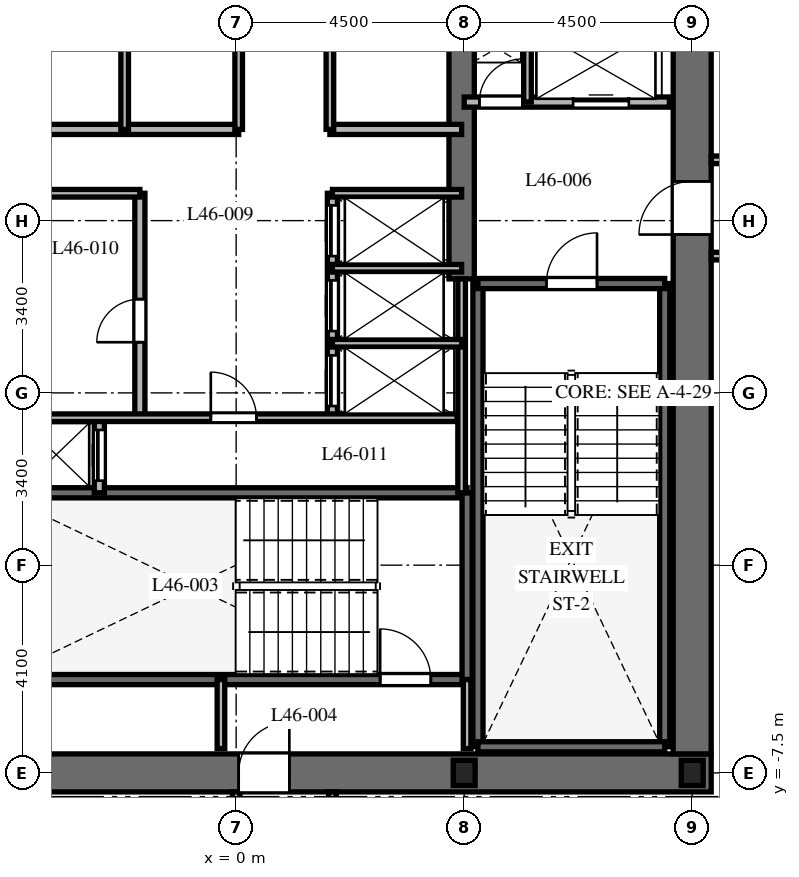
"""IFC4 building model, lengths in metres.
Left out: names, types, materials, properties, quantities, classifications, styles, units other than length and angle.
Written with IfcOpenShell. Run it as: python <this file> out.ifc"""

import sys

from ifc_helpers import new_model, si_unit, direction, frame, frame_2d, origin, origin_2d, place, context, subcontext, project, spatial, rectangle, i_section, extrude, element, fill, save


model = new_model("IFC4")
c1 = context("Model", 3, precision=1e-05, world=origin(), true_north=direction((0.0, 1.0)))
c2 = subcontext(c1, "Body", "Model", "MODEL_VIEW")
j1 = project(units=[si_unit("LENGTHUNIT", "METRE"), si_unit("PLANEANGLEUNIT", "RADIAN")], contexts=[c1])
p1 = place(None, origin())
s1 = spatial("IfcSite", under=j1, at=p1, CompositionType="ELEMENT")
p2 = place(p1, origin())
s2 = spatial("IfcBuilding", under=s1, at=p2, CompositionType="ELEMENT")
p3 = place(p2, frame((0.0, 0.0, 186.7)))
s3 = spatial("IfcBuildingStorey", under=s2, at=p3, CompositionType="ELEMENT", Elevation=186.7)
p4 = place(p3, frame((-9.375, -7.5, 0.0), z_axis=(0.0, 0.0, 1.0), x_axis=(1.0, 0.0, 0.0)))
e1 = element("IfcWall", 1, at=p4, inside=s3, PredefinedType="SHEAR", context=c2, shape_type="SweptSolid", body=[
    extrude(rectangle(XDim=18.75, YDim=0.75, at=frame_2d((9.375, 0.0))), origin(), (0.0, 0.0, 1.0), 3.7),
])
p5 = place(p4, frame((9.425, 0.0, 0.0)))
e2 = element("IfcOpeningElement", 2, at=p5, cuts=e1, PredefinedType="OPENING", context=c2, shape_type="SweptSolid", body=[
    extrude(rectangle(XDim=1.0, YDim=2.15, at=frame_2d((0.5, 1.075))), frame((0.0, 0.385, 0.0), z_axis=(0.0, -1.0, 0.0), x_axis=(1.0, 0.0, 0.0)), (0.0, 0.0, 1.0), 0.77),
])
p6 = place(p3, frame((9.0, -7.125, 0.0), z_axis=(0.0, 0.0, 1.0), x_axis=(0.0, 1.0, 0.0)))
e3 = element("IfcWall", 3, at=p6, inside=s3, PredefinedType="SHEAR", context=c2, shape_type="SweptSolid", body=[
    extrude(rectangle(XDim=14.25, YDim=0.75, at=frame_2d((7.125, 0.0))), origin(), (0.0, 0.0, 1.0), 3.7),
])
p7 = place(p6, frame((10.25, 0.0, 0.0)))
e4 = element("IfcOpeningElement", 4, at=p7, cuts=e3, PredefinedType="OPENING", context=c2, shape_type="SweptSolid", body=[
    extrude(rectangle(XDim=1.05, YDim=2.15, at=frame_2d((0.525, 1.075))), frame((0.0, 0.385, 0.0), z_axis=(0.0, -1.0, 0.0), x_axis=(1.0, 0.0, 0.0)), (0.0, 0.0, 1.0), 0.77),
])
p8 = place(p3, frame((4.45, 2.25, 0.0), z_axis=(0.0, 0.0, 1.0), x_axis=(0.0, 1.0, 0.0)))
e5 = element("IfcWall", 5, at=p8, inside=s3, PredefinedType="SHEAR", context=c2, shape_type="SweptSolid", body=[
    extrude(rectangle(XDim=4.875, YDim=0.5, at=frame_2d((2.438, 0.0))), origin(), (0.0, 0.0, 1.0), 3.7),
])
for number, where, z_axis, x_axis in (
    (6, (4.772, -6.985, 0.0), (0.0, 0.0, 1.0), (0.0, 1.0, 0.0)),
    (7, (8.458, -6.985, 0.0), (0.0, 0.0, 1.0), (0.0, 1.0, 0.0)),
):
    element("IfcWall", number, at=place(p3, frame(where, z_axis=z_axis, x_axis=x_axis)), inside=s3, PredefinedType="SHEAR", context=c2, shape_type="SweptSolid", body=[
        extrude(rectangle(XDim=9.143, YDim=0.2, at=frame_2d((4.572, 0.0))), origin(), (0.0, 0.0, 1.0), 3.7),
    ])
p9 = place(p3, frame((4.772, -6.985, 0.0), z_axis=(0.0, 0.0, 1.0), x_axis=(1.0, 0.0, 0.0)))
e8 = element("IfcWall", 8, at=p9, inside=s3, PredefinedType="SHEAR", context=c2, shape_type="SweptSolid", body=[
    extrude(rectangle(XDim=3.686, YDim=0.2, at=frame_2d((1.843, 0.0))), origin(), (0.0, 0.0, 1.0), 3.7),
])
p10 = place(p3, frame((4.772, 2.158, 0.0), z_axis=(0.0, 0.0, 1.0), x_axis=(1.0, 0.0, 0.0)))
e9 = element("IfcWall", 9, at=p10, inside=s3, PredefinedType="SHEAR", context=c2, shape_type="SweptSolid", body=[
    extrude(rectangle(XDim=3.686, YDim=0.2, at=frame_2d((1.843, 0.0))), origin(), (0.0, 0.0, 1.0), 3.7),
])
p11 = place(p10, frame((1.35, 0.0, 0.0)))
e10 = element("IfcOpeningElement", 10, at=p11, cuts=e9, PredefinedType="OPENING", context=c2, shape_type="SweptSolid", body=[
    extrude(rectangle(XDim=1.0, YDim=2.15, at=frame_2d((0.5, 1.075))), frame((0.0, 0.11, 0.0), z_axis=(0.0, -1.0, 0.0), x_axis=(1.0, 0.0, 0.0)), (0.0, 0.0, 1.0), 0.22),
])
p12 = place(p3, frame((-4.608, -5.658, 0.0), z_axis=(0.0, 0.0, 1.0), x_axis=(1.0, 0.0, 0.0)))
e11 = element("IfcWall", 11, at=p12, inside=s3, PredefinedType="SHEAR", context=c2, shape_type="SweptSolid", body=[
    extrude(rectangle(XDim=9.166, YDim=0.2, at=frame_2d((4.583, 0.0))), origin(), (0.0, 0.0, 1.0), 3.7),
])
p13 = place(p12, frame((7.45, 0.0, 0.0)))
e12 = element("IfcOpeningElement", 12, at=p13, cuts=e11, PredefinedType="OPENING", context=c2, shape_type="SweptSolid", body=[
    extrude(rectangle(XDim=1.0, YDim=2.15, at=frame_2d((0.5, 1.075))), frame((0.0, 0.11, 0.0), z_axis=(0.0, -1.0, 0.0), x_axis=(1.0, 0.0, 0.0)), (0.0, 0.0, 1.0), 0.22),
])
p14 = place(p3, frame((-4.608, -1.972, 0.0), z_axis=(0.0, 0.0, 1.0), x_axis=(1.0, 0.0, 0.0)))
e13 = element("IfcWall", 13, at=p14, inside=s3, PredefinedType="SHEAR", context=c2, shape_type="SweptSolid", body=[
    extrude(rectangle(XDim=9.166, YDim=0.2, at=frame_2d((4.583, 0.0))), origin(), (0.0, 0.0, 1.0), 3.7),
])
p15 = place(p3, frame((4.558, -5.658, 0.0), z_axis=(0.0, 0.0, 1.0), x_axis=(0.0, 1.0, 0.0)))
e14 = element("IfcWall", 14, at=p15, inside=s3, PredefinedType="SHEAR", context=c2, shape_type="SweptSolid", body=[
    extrude(rectangle(XDim=3.686, YDim=0.2, at=frame_2d((1.843, 0.0))), origin(), (0.0, 0.0, 1.0), 3.7),
])
for number, where, z_axis, x_axis in (
    (15, (4.5, -7.5, 0.0), (0.0, 0.0, 1.0), (1.0, 0.0, 0.0)),
    (16, (9.0, -7.5, 0.0), (0.0, 0.0, 1.0), (1.0, 0.0, 0.0)),
):
    element("IfcColumn", number, at=place(p3, frame(where, z_axis=z_axis, x_axis=x_axis)), inside=s3, PredefinedType="COLUMN", context=c2, shape_type="SweptSolid", body=[
        extrude(i_section(OverallWidth=0.432, OverallDepth=0.498, WebThickness=0.056, FlangeThickness=0.089, at=origin_2d()), origin(), (0.0, 0.0, 1.0), 3.7),
    ])
for number, where, z_axis, x_axis in (
    (17, (-0.3, -7.02, 0.0), (0.0, 0.0, 1.0), (0.0, 1.0, 0.0)),
    (18, (4.558, -7.02, 0.0), (0.0, 0.0, 1.0), (0.0, 1.0, 0.0)),
):
    element("IfcWall", number, at=place(p3, frame(where, z_axis=z_axis, x_axis=x_axis)), inside=s3, PredefinedType="PARTITIONING", context=c2, shape_type="SweptSolid", body=[
        extrude(rectangle(XDim=1.362, YDim=0.15, at=frame_2d((0.681, 0.0))), origin(), (0.0, 0.0, 1.0), 3.4),
    ])
p16 = place(p3, frame((4.5, 5.74, 0.0), z_axis=(0.0, 0.0, 1.0), x_axis=(1.0, 0.0, 0.0)))
e19 = element("IfcWall", 19, at=p16, inside=s3, PredefinedType="PARTITIONING", context=c2, shape_type="SweptSolid", body=[
    extrude(rectangle(XDim=4.05, YDim=0.2, at=frame_2d((2.025, 0.0))), origin(), (0.0, 0.0, 1.0), 3.4),
])
p17 = place(p16, frame((0.3, 0.0, 0.0)))
e20 = element("IfcOpeningElement", 20, at=p17, cuts=e19, PredefinedType="OPENING", context=c2, shape_type="SweptSolid", body=[
    extrude(rectangle(XDim=0.85, YDim=2.03, at=frame_2d((0.425, 1.015))), frame((0.0, 0.11, 0.0), z_axis=(0.0, -1.0, 0.0), x_axis=(1.0, 0.0, 0.0)), (0.0, 0.0, 1.0), 0.22),
])
p18 = place(p16, frame((2.15, 0.0, 0.0)))
e21 = element("IfcOpeningElement", 21, at=p18, cuts=e19, PredefinedType="OPENING", context=c2, shape_type="SweptSolid", body=[
    extrude(rectangle(XDim=1.1, YDim=2.2, at=frame_2d((0.55, 1.1))), frame((0.0, 0.11, 0.0), z_axis=(0.0, -1.0, 0.0), x_axis=(1.0, 0.0, 0.0)), (0.0, 0.0, 1.0), 0.22),
])
p19 = place(p3, frame((5.75, 5.74, 0.0), z_axis=(0.0, 0.0, 1.0), x_axis=(0.0, 1.0, 0.0)))
e22 = element("IfcWall", 22, at=p19, inside=s3, PredefinedType="PARTITIONING", context=c2, shape_type="SweptSolid", body=[
    extrude(rectangle(XDim=1.41, YDim=0.15, at=frame_2d((0.705, 0.0))), origin(), (0.0, 0.0, 1.0), 3.4),
])
p20 = place(p3, frame((-2.7, -1.972, 0.0), z_axis=(0.0, 0.0, 1.0), x_axis=(0.0, 1.0, 0.0)))
e23 = element("IfcWall", 23, at=p20, inside=s3, PredefinedType="PARTITIONING", context=c2, shape_type="SweptSolid", body=[
    extrude(rectangle(XDim=1.472, YDim=0.2, at=frame_2d((0.736, 0.0))), origin(), (0.0, 0.0, 1.0), 3.4),
])
p21 = place(p20, frame((0.24, 0.0, 0.0)))
e24 = element("IfcOpeningElement", 24, at=p21, cuts=e23, PredefinedType="OPENING", context=c2, shape_type="SweptSolid", body=[
    extrude(rectangle(XDim=1.0, YDim=2.2, at=frame_2d((0.5, 1.1))), frame((0.0, 0.11, 0.0), z_axis=(0.0, -1.0, 0.0), x_axis=(1.0, 0.0, 0.0)), (0.0, 0.0, 1.0), 0.22),
])
p22 = place(p3, frame((-4.45, 5.2, 0.0), z_axis=(0.0, 0.0, 1.0), x_axis=(1.0, 0.0, 0.0)))
e25 = element("IfcWall", 25, at=p22, inside=s3, PredefinedType="PARTITIONING", context=c2, shape_type="SweptSolid", body=[
    extrude(rectangle(XDim=4.5, YDim=0.2, at=frame_2d((2.25, 0.0))), origin(), (0.0, 0.0, 1.0), 3.4),
])
p23 = place(p3, frame((1.85, 5.2, 0.0), z_axis=(0.0, 0.0, 1.0), x_axis=(1.0, 0.0, 0.0)))
e26 = element("IfcWall", 26, at=p23, inside=s3, PredefinedType="PARTITIONING", context=c2, shape_type="SweptSolid", body=[
    extrude(rectangle(XDim=2.6, YDim=0.2, at=frame_2d((1.3, 0.0))), origin(), (0.0, 0.0, 1.0), 3.4),
])
p24 = place(p3, frame((-2.2, 5.2, 0.0), z_axis=(0.0, 0.0, 1.0), x_axis=(0.0, 1.0, 0.0)))
e27 = element("IfcWall", 27, at=p24, inside=s3, PredefinedType="PARTITIONING", context=c2, shape_type="SweptSolid", body=[
    extrude(rectangle(XDim=1.85, YDim=0.15, at=frame_2d((0.925, 0.0))), origin(), (0.0, 0.0, 1.0), 3.4),
])
for number, where, z_axis, x_axis in (
    (28, (0.05, 5.2, 0.0), (0.0, 0.0, 1.0), (0.0, 1.0, 0.0)),
    (29, (1.85, 5.2, 0.0), (0.0, 0.0, 1.0), (0.0, 1.0, 0.0)),
):
    element("IfcWall", number, at=place(p3, frame(where, z_axis=z_axis, x_axis=x_axis)), inside=s3, PredefinedType="PARTITIONING", context=c2, shape_type="SweptSolid", body=[
        extrude(rectangle(XDim=1.95, YDim=0.15, at=frame_2d((0.975, 0.0))), origin(), (0.0, 0.0, 1.0), 3.4),
    ])
p25 = place(p3, frame((4.45, -1.972, 0.0), z_axis=(0.0, 0.0, 1.0), x_axis=(0.0, 1.0, 0.0)))
e30 = element("IfcWall", 30, at=p25, inside=s3, PredefinedType="PARTITIONING", context=c2, shape_type="SweptSolid", body=[
    extrude(rectangle(XDim=4.222, YDim=0.15, at=frame_2d((2.111, 0.0))), origin(), (0.0, 0.0, 1.0), 3.4),
])
p26 = place(p3, frame((-1.9, -0.5, 0.0), z_axis=(0.0, 0.0, 1.0), x_axis=(0.0, 1.0, 0.0)))
e31 = element("IfcWall", 31, at=p26, inside=s3, PredefinedType="PARTITIONING", context=c2, shape_type="SweptSolid", body=[
    extrude(rectangle(XDim=4.44, YDim=0.2, at=frame_2d((2.22, 0.0))), origin(), (0.0, 0.0, 1.0), 3.4),
])
p27 = place(p26, frame((1.5, 0.0, 0.0)))
e32 = element("IfcOpeningElement", 32, at=p27, cuts=e31, PredefinedType="OPENING", context=c2, shape_type="SweptSolid", body=[
    extrude(rectangle(XDim=0.85, YDim=2.03, at=frame_2d((0.425, 1.015))), frame((0.0, 0.11, 0.0), z_axis=(0.0, -1.0, 0.0), x_axis=(1.0, 0.0, 0.0)), (0.0, 0.0, 1.0), 0.22),
])
p28 = place(p3, frame((-4.45, 3.94, 0.0), z_axis=(0.0, 0.0, 1.0), x_axis=(1.0, 0.0, 0.0)))
e33 = element("IfcWall", 33, at=p28, inside=s3, PredefinedType="PARTITIONING", context=c2, shape_type="SweptSolid", body=[
    extrude(rectangle(XDim=2.55, YDim=0.15, at=frame_2d((1.275, 0.0))), origin(), (0.0, 0.0, 1.0), 3.4),
])
p29 = place(p3, frame((1.9, -0.5, 0.0), z_axis=(0.0, 0.0, 1.0), x_axis=(0.0, 1.0, 0.0)))
e34 = element("IfcWall", 34, at=p29, inside=s3, PredefinedType="PARTITIONING", context=c2, shape_type="SweptSolid", body=[
    extrude(rectangle(XDim=4.44, YDim=0.2, at=frame_2d((2.22, 0.0))), origin(), (0.0, 0.0, 1.0), 3.4),
])
p30 = place(p29, frame((0.24, 0.0, 0.0)))
e35 = element("IfcOpeningElement", 35, at=p30, cuts=e34, PredefinedType="OPENING", context=c2, shape_type="SweptSolid", body=[
    extrude(rectangle(XDim=1.0, YDim=2.2, at=frame_2d((0.5, 1.1))), frame((0.0, 0.11, 0.0), z_axis=(0.0, -1.0, 0.0), x_axis=(1.0, 0.0, 0.0)), (0.0, 0.0, 1.0), 0.22),
])
p31 = place(p29, frame((1.72, 0.0, 0.0)))
e36 = element("IfcOpeningElement", 36, at=p31, cuts=e34, PredefinedType="OPENING", context=c2, shape_type="SweptSolid", body=[
    extrude(rectangle(XDim=1.0, YDim=2.2, at=frame_2d((0.5, 1.1))), frame((0.0, 0.11, 0.0), z_axis=(0.0, -1.0, 0.0), x_axis=(1.0, 0.0, 0.0)), (0.0, 0.0, 1.0), 0.22),
])
p32 = place(p29, frame((3.2, 0.0, 0.0)))
e37 = element("IfcOpeningElement", 37, at=p32, cuts=e34, PredefinedType="OPENING", context=c2, shape_type="SweptSolid", body=[
    extrude(rectangle(XDim=1.0, YDim=2.2, at=frame_2d((0.5, 1.1))), frame((0.0, 0.11, 0.0), z_axis=(0.0, -1.0, 0.0), x_axis=(1.0, 0.0, 0.0)), (0.0, 0.0, 1.0), 0.22),
])
for number, where, z_axis, x_axis in (
    (38, (1.9, 3.94, 0.0), (0.0, 0.0, 1.0), (1.0, 0.0, 0.0)),
    (39, (1.9, 0.98, 0.0), (0.0, 0.0, 1.0), (1.0, 0.0, 0.0)),
    (40, (1.9, 2.46, 0.0), (0.0, 0.0, 1.0), (1.0, 0.0, 0.0)),
):
    element("IfcWall", number, at=place(p3, frame(where, z_axis=z_axis, x_axis=x_axis)), inside=s3, PredefinedType="PARTITIONING", context=c2, shape_type="SweptSolid", body=[
        extrude(rectangle(XDim=2.55, YDim=0.15, at=frame_2d((1.275, 0.0))), origin(), (0.0, 0.0, 1.0), 3.4),
    ])
p33 = place(p3, frame((-4.36, -0.49, 0.0), z_axis=(0.0, 0.0, 1.0), x_axis=(1.0, 0.0, 0.0)))
e41 = element("IfcWall", 41, at=p33, inside=s3, PredefinedType="PARTITIONING", context=c2, shape_type="SweptSolid", body=[
    extrude(rectangle(XDim=8.72, YDim=0.15, at=frame_2d((4.36, 0.0))), origin(), (0.0, 0.0, 1.0), 3.4),
])
p34 = place(p33, frame((3.86, 0.0, 0.0)))
e42 = element("IfcOpeningElement", 42, at=p34, cuts=e41, PredefinedType="OPENING", context=c2, shape_type="SweptSolid", body=[
    extrude(rectangle(XDim=0.9, YDim=2.03, at=frame_2d((0.45, 1.015))), frame((0.0, 0.085, 0.0), z_axis=(0.0, -1.0, 0.0), x_axis=(1.0, 0.0, 0.0)), (0.0, 0.0, 1.0), 0.17),
])
p35 = place(p3, frame((11.55, 2.7, 0.0), z_axis=(0.0, 0.0, 1.0), x_axis=(-1.0, 0.0, 0.0)))
e43 = element("IfcWall", 43, at=p35, inside=s3, PredefinedType="PARTITIONING", context=c2, shape_type="SweptSolid", body=[
    extrude(rectangle(XDim=2.175, YDim=0.15, at=frame_2d((1.087, 0.0))), origin(), (0.0, 0.0, 1.0), 3.4),
])
p36 = place(p3, frame((9.375, 4.6, 0.0), z_axis=(0.0, 0.0, 1.0), x_axis=(1.0, 0.0, 0.0)))
e44 = element("IfcWall", 44, at=p36, inside=s3, PredefinedType="PARTITIONING", context=c2, shape_type="SweptSolid", body=[
    extrude(rectangle(XDim=2.175, YDim=0.15, at=frame_2d((1.087, 0.0))), origin(), (0.0, 0.0, 1.0), 3.4),
])
p37 = place(p36, frame((0.663, 0.0, 0.0)))
e45 = element("IfcOpeningElement", 45, at=p37, cuts=e44, PredefinedType="OPENING", context=c2, shape_type="SweptSolid", body=[
    extrude(rectangle(XDim=0.85, YDim=2.03, at=frame_2d((0.425, 1.015))), frame((0.0, 0.085, 0.0), z_axis=(0.0, -1.0, 0.0), x_axis=(1.0, 0.0, 0.0)), (0.0, 0.0, 1.0), 0.17),
])
for number, where, z_axis, x_axis in (
    (46, (0.0, -10.05, 0.0), (0.0, 0.0, 1.0), (0.0, 1.0, 0.0)),
    (47, (1.9, -7.875, 0.0), (0.0, 0.0, 1.0), (0.0, -1.0, 0.0)),
):
    element("IfcWall", number, at=place(p3, frame(where, z_axis=z_axis, x_axis=x_axis)), inside=s3, PredefinedType="PARTITIONING", context=c2, shape_type="SweptSolid", body=[
        extrude(rectangle(XDim=2.175, YDim=0.15, at=frame_2d((1.087, 0.0))), origin(), (0.0, 0.0, 1.0), 3.4),
    ])
p38 = place(p11, origin())
e48 = element("IfcDoor", 48, at=p38, inside=s3, OperationType="SINGLE_SWING_RIGHT", PredefinedType="DOOR", context=c2, shape_type="SweptSolid", body=[
    extrude(rectangle(XDim=1.0, YDim=2.15, at=frame_2d((0.5, 1.075))), frame((0.0, 0.025, 0.0), z_axis=(0.0, -1.0, 0.0), x_axis=(1.0, 0.0, 0.0)), (0.0, 0.0, 1.0), 0.05),
])
fill(e10, e48)
p39 = place(p13, origin())
e49 = element("IfcDoor", 49, at=p39, inside=s3, OperationType="SINGLE_SWING_LEFT", PredefinedType="DOOR", context=c2, shape_type="SweptSolid", body=[
    extrude(rectangle(XDim=1.0, YDim=2.15, at=frame_2d((0.5, 1.075))), frame((0.0, 0.025, 0.0), z_axis=(0.0, -1.0, 0.0), x_axis=(1.0, 0.0, 0.0)), (0.0, 0.0, 1.0), 0.05),
])
fill(e12, e49)
p40 = place(p5, origin())
e50 = element("IfcDoor", 50, at=p40, inside=s3, OperationType="SINGLE_SWING_RIGHT", PredefinedType="DOOR", context=c2, shape_type="SweptSolid", body=[
    extrude(rectangle(XDim=1.0, YDim=2.15, at=frame_2d((0.5, 1.075))), frame((0.0, 0.025, 0.0), z_axis=(0.0, -1.0, 0.0), x_axis=(1.0, 0.0, 0.0)), (0.0, 0.0, 1.0), 0.05),
])
fill(e2, e50)
p41 = place(p7, origin())
e51 = element("IfcDoor", 51, at=p41, inside=s3, OperationType="SINGLE_SWING_LEFT", PredefinedType="DOOR", context=c2, shape_type="SweptSolid", body=[
    extrude(rectangle(XDim=1.05, YDim=2.15, at=frame_2d((0.525, 1.075))), frame((0.0, 0.025, 0.0), z_axis=(0.0, -1.0, 0.0), x_axis=(1.0, 0.0, 0.0)), (0.0, 0.0, 1.0), 0.05),
])
fill(e4, e51)
p42 = place(p17, origin())
e52 = element("IfcDoor", 52, at=p42, inside=s3, OperationType="SINGLE_SWING_RIGHT", PredefinedType="DOOR", context=c2, shape_type="SweptSolid", body=[
    extrude(rectangle(XDim=0.85, YDim=2.03, at=frame_2d((0.425, 1.015))), frame((0.0, 0.025, 0.0), z_axis=(0.0, -1.0, 0.0), x_axis=(1.0, 0.0, 0.0)), (0.0, 0.0, 1.0), 0.05),
])
fill(e20, e52)
p43 = place(p18, origin())
e53 = element("IfcDoor", 53, at=p43, inside=s3, OperationType="SLIDING_TO_RIGHT", PredefinedType="DOOR", context=c2, shape_type="SweptSolid", body=[
    extrude(rectangle(XDim=1.1, YDim=2.2, at=frame_2d((0.55, 1.1))), frame((0.0, 0.025, 0.0), z_axis=(0.0, -1.0, 0.0), x_axis=(1.0, 0.0, 0.0)), (0.0, 0.0, 1.0), 0.05),
])
fill(e21, e53)
p44 = place(p21, origin())
e54 = element("IfcDoor", 54, at=p44, inside=s3, OperationType="SLIDING_TO_LEFT", PredefinedType="DOOR", context=c2, shape_type="SweptSolid", body=[
    extrude(rectangle(XDim=1.0, YDim=2.2, at=frame_2d((0.5, 1.1))), frame((0.0, 0.025, 0.0), z_axis=(0.0, -1.0, 0.0), x_axis=(1.0, 0.0, 0.0)), (0.0, 0.0, 1.0), 0.05),
])
fill(e24, e54)
p45 = place(p27, origin())
e55 = element("IfcDoor", 55, at=p45, inside=s3, OperationType="SINGLE_SWING_LEFT", PredefinedType="DOOR", context=c2, shape_type="SweptSolid", body=[
    extrude(rectangle(XDim=0.85, YDim=2.03, at=frame_2d((0.425, 1.015))), frame((0.0, 0.025, 0.0), z_axis=(0.0, -1.0, 0.0), x_axis=(1.0, 0.0, 0.0)), (0.0, 0.0, 1.0), 0.05),
])
fill(e32, e55)
p46 = place(p30, origin())
e56 = element("IfcDoor", 56, at=p46, inside=s3, OperationType="SLIDING_TO_RIGHT", PredefinedType="DOOR", context=c2, shape_type="SweptSolid", body=[
    extrude(rectangle(XDim=1.0, YDim=2.2, at=frame_2d((0.5, 1.1))), frame((0.0, 0.025, 0.0), z_axis=(0.0, -1.0, 0.0), x_axis=(1.0, 0.0, 0.0)), (0.0, 0.0, 1.0), 0.05),
])
fill(e35, e56)
p47 = place(p31, origin())
e57 = element("IfcDoor", 57, at=p47, inside=s3, OperationType="SLIDING_TO_RIGHT", PredefinedType="DOOR", context=c2, shape_type="SweptSolid", body=[
    extrude(rectangle(XDim=1.0, YDim=2.2, at=frame_2d((0.5, 1.1))), frame((0.0, 0.025, 0.0), z_axis=(0.0, -1.0, 0.0), x_axis=(1.0, 0.0, 0.0)), (0.0, 0.0, 1.0), 0.05),
])
fill(e36, e57)
p48 = place(p32, origin())
e58 = element("IfcDoor", 58, at=p48, inside=s3, OperationType="SLIDING_TO_RIGHT", PredefinedType="DOOR", context=c2, shape_type="SweptSolid", body=[
    extrude(rectangle(XDim=1.0, YDim=2.2, at=frame_2d((0.5, 1.1))), frame((0.0, 0.025, 0.0), z_axis=(0.0, -1.0, 0.0), x_axis=(1.0, 0.0, 0.0)), (0.0, 0.0, 1.0), 0.05),
])
fill(e37, e58)
p49 = place(p34, origin())
e59 = element("IfcDoor", 59, at=p49, inside=s3, OperationType="SINGLE_SWING_LEFT", PredefinedType="DOOR", context=c2, shape_type="SweptSolid", body=[
    extrude(rectangle(XDim=0.9, YDim=2.03, at=frame_2d((0.45, 1.015))), frame((0.0, 0.025, 0.0), z_axis=(0.0, -1.0, 0.0), x_axis=(1.0, 0.0, 0.0)), (0.0, 0.0, 1.0), 0.05),
])
fill(e42, e59)
save(model, sys.argv[1])
